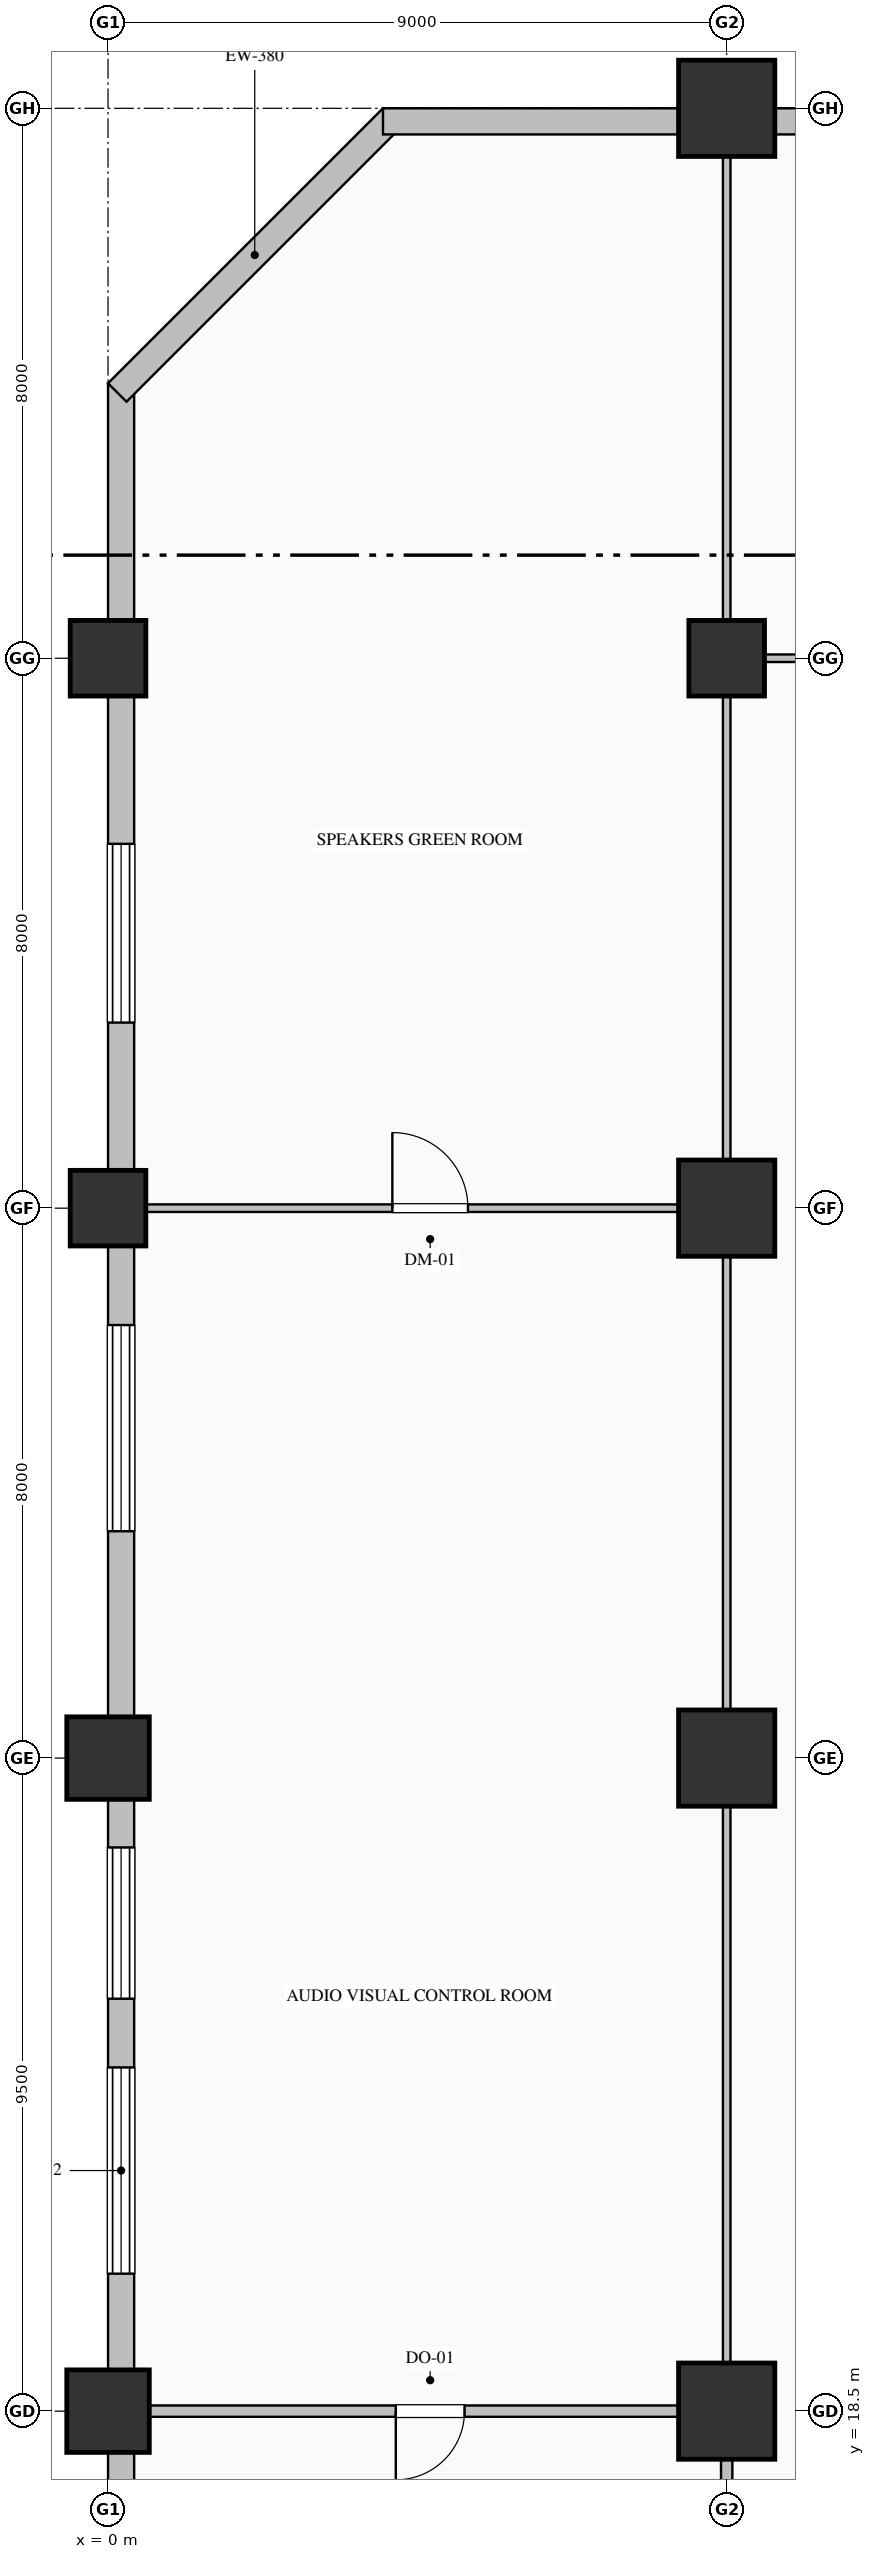
"""IFC4 building model, lengths in metres.
Left out: names, types, materials, properties, quantities, classifications, styles, units other than length and angle.
Written with IfcOpenShell. Run it as: python <this file> out.ifc"""

import sys

from ifc_helpers import new_model, si_unit, direction, frame, frame_2d, origin, origin_2d, place, context, subcontext, project, spatial, rectangle, hollow_rectangle, hollow_circle, extrude, element, fill, save


model = new_model("IFC4")
c1 = context("Model", 3, precision=1e-05, world=origin(), true_north=direction((0.0, 1.0)))
c2 = subcontext(c1, "Body", "Model", "MODEL_VIEW")
j1 = project(units=[si_unit("LENGTHUNIT", "METRE"), si_unit("PLANEANGLEUNIT", "RADIAN")], contexts=[c1])
p1 = place(None, origin())
s1 = spatial("IfcSite", under=j1, at=p1, CompositionType="ELEMENT")
p2 = place(p1, origin())
s2 = spatial("IfcBuilding", under=s1, at=p2, CompositionType="ELEMENT")
p3 = place(p2, frame((0.0, 0.0, 11.4)))
s3 = spatial("IfcBuildingStorey", under=s2, at=p3, CompositionType="ELEMENT", Elevation=11.4)
for number, where, z_axis, x_axis in (
    (1, (0.0, 18.5, 0.0), (0.0, 0.0, 1.0), (1.0, 0.0, 0.0)),
    (2, (0.0, 28.0, 0.0), (0.0, 0.0, 1.0), (1.0, 0.0, 0.0)),
):
    element("IfcColumn", number, at=place(p3, frame(where, z_axis=z_axis, x_axis=x_axis)), inside=s3, PredefinedType="COLUMN", context=c2, shape_type="SweptSolid", body=[
        extrude(hollow_circle(Radius=0.6, WallThickness=0.04, at=origin_2d()), origin(), (0.0, 0.0, 1.0), 6.0),
    ])
for number, where, z_axis, x_axis in (
    (3, (0.0, 36.0, 0.0), (0.0, 0.0, 1.0), (1.0, 0.0, 0.0)),
    (4, (0.0, 44.0, 0.0), (0.0, 0.0, 1.0), (1.0, 0.0, 0.0)),
):
    element("IfcColumn", number, at=place(p3, frame(where, z_axis=z_axis, x_axis=x_axis)), inside=s3, PredefinedType="COLUMN", context=c2, shape_type="SweptSolid", body=[
        extrude(hollow_rectangle(XDim=1.1, YDim=1.1, WallThickness=0.04, at=origin_2d()), origin(), (0.0, 0.0, 1.0), 6.0),
    ])
for number, where, z_axis, x_axis in (
    (5, (9.0, 18.5, 0.0), (0.0, 0.0, 1.0), (1.0, 0.0, 0.0)),
    (6, (9.0, 28.0, 0.0), (0.0, 0.0, 1.0), (1.0, 0.0, 0.0)),
    (7, (9.0, 36.0, 0.0), (0.0, 0.0, 1.0), (1.0, 0.0, 0.0)),
):
    element("IfcColumn", number, at=place(p3, frame(where, z_axis=z_axis, x_axis=x_axis)), inside=s3, PredefinedType="COLUMN", context=c2, shape_type="SweptSolid", body=[
        extrude(hollow_rectangle(XDim=1.4, YDim=1.4, WallThickness=0.05, at=origin_2d()), origin(), (0.0, 0.0, 1.0), 6.0),
    ])
p4 = place(p3, frame((9.0, 44.0, 0.0), z_axis=(0.0, 0.0, 1.0), x_axis=(1.0, 0.0, 0.0)))
e8 = element("IfcColumn", 8, at=p4, inside=s3, PredefinedType="COLUMN", context=c2, shape_type="SweptSolid", body=[
    extrude(rectangle(XDim=1.1, YDim=1.1, at=origin_2d()), origin(), (0.0, 0.0, 1.0), 6.0),
])
p5 = place(p3, frame((9.0, 52.0, 0.0), z_axis=(0.0, 0.0, 1.0), x_axis=(1.0, 0.0, 0.0)))
e9 = element("IfcColumn", 9, at=p5, inside=s3, PredefinedType="COLUMN", context=c2, shape_type="SweptSolid", body=[
    extrude(hollow_rectangle(XDim=1.4, YDim=1.4, WallThickness=0.05, at=origin_2d()), origin(), (0.0, 0.0, 1.0), 6.0),
])
p6 = place(p3, frame((0.19, 4.0, 0.0), z_axis=(0.0, 0.0, 1.0), x_axis=(0.0, 1.0, 0.0)))
e10 = element("IfcWall", 10, at=p6, inside=s3, PredefinedType="SOLIDWALL", context=c2, shape_type="SweptSolid", body=[
    extrude(rectangle(XDim=44.0, YDim=0.38, at=frame_2d((22.0, 0.0))), origin(), (0.0, 0.0, 1.0), 5.05),
])
p7 = place(p6, frame((2.3, 0.0, 0.85)))
e11 = element("IfcOpeningElement", 11, at=p7, cuts=e10, PredefinedType="OPENING", context=c2, shape_type="SweptSolid", body=[
    extrude(rectangle(XDim=2.6, YDim=3.1, at=frame_2d((1.3, 1.55))), frame((0.0, 0.2, 0.0), z_axis=(0.0, -1.0, 0.0), x_axis=(1.0, 0.0, 0.0)), (0.0, 0.0, 1.0), 0.4),
])
p8 = place(p6, frame((9.7, 0.0, 0.9)))
e12 = element("IfcOpeningElement", 12, at=p8, cuts=e10, PredefinedType="OPENING", context=c2, shape_type="SweptSolid", body=[
    extrude(rectangle(XDim=2.2, YDim=2.65, at=frame_2d((1.1, 1.325))), frame((0.0, 0.2, 0.0), z_axis=(0.0, -1.0, 0.0), x_axis=(1.0, 0.0, 0.0)), (0.0, 0.0, 1.0), 0.4),
])
p9 = place(p6, frame((16.5, 0.0, 0.85)))
e13 = element("IfcOpeningElement", 13, at=p9, cuts=e10, PredefinedType="OPENING", context=c2, shape_type="SweptSolid", body=[
    extrude(rectangle(XDim=3.0, YDim=3.2, at=frame_2d((1.5, 1.6))), frame((0.0, 0.2, 0.0), z_axis=(0.0, -1.0, 0.0), x_axis=(1.0, 0.0, 0.0)), (0.0, 0.0, 1.0), 0.4),
])
p10 = place(p6, frame((20.5, 0.0, 0.9)))
e14 = element("IfcOpeningElement", 14, at=p10, cuts=e10, PredefinedType="OPENING", context=c2, shape_type="SweptSolid", body=[
    extrude(rectangle(XDim=2.2, YDim=2.65, at=frame_2d((1.1, 1.325))), frame((0.0, 0.2, 0.0), z_axis=(0.0, -1.0, 0.0), x_axis=(1.0, 0.0, 0.0)), (0.0, 0.0, 1.0), 0.4),
])
p11 = place(p6, frame((27.3, 0.0, 0.85)))
e15 = element("IfcOpeningElement", 15, at=p11, cuts=e10, PredefinedType="OPENING", context=c2, shape_type="SweptSolid", body=[
    extrude(rectangle(XDim=3.0, YDim=3.2, at=frame_2d((1.5, 1.6))), frame((0.0, 0.2, 0.0), z_axis=(0.0, -1.0, 0.0), x_axis=(1.0, 0.0, 0.0)), (0.0, 0.0, 1.0), 0.4),
])
p12 = place(p6, frame((34.7, 0.0, 0.85)))
e16 = element("IfcOpeningElement", 16, at=p12, cuts=e10, PredefinedType="OPENING", context=c2, shape_type="SweptSolid", body=[
    extrude(rectangle(XDim=2.6, YDim=3.1, at=frame_2d((1.3, 1.55))), frame((0.0, 0.2, 0.0), z_axis=(0.0, -1.0, 0.0), x_axis=(1.0, 0.0, 0.0)), (0.0, 0.0, 1.0), 0.4),
])
p13 = place(p3, frame((0.134, 47.866, 0.0), z_axis=(0.0, 0.0, 1.0), x_axis=(0.707106781187, 0.707106781187, 0.0)))
e17 = element("IfcWall", 17, at=p13, inside=s3, PredefinedType="SOLIDWALL", context=c2, shape_type="SweptSolid", body=[
    extrude(rectangle(XDim=5.657, YDim=0.38, at=frame_2d((2.828, 0.0))), origin(), (0.0, 0.0, 1.0), 5.55),
])
p14 = place(p3, frame((4.0, 51.81, 0.0), z_axis=(0.0, 0.0, 1.0), x_axis=(1.0, 0.0, 0.0)))
e18 = element("IfcWall", 18, at=p14, inside=s3, PredefinedType="SOLIDWALL", context=c2, shape_type="SweptSolid", body=[
    extrude(rectangle(XDim=36.52, YDim=0.38, at=frame_2d((18.26, 0.0))), origin(), (0.0, 0.0, 1.0), 5.05),
])
p15 = place(p14, frame((16.7, 0.0, 0.85)))
e19 = element("IfcOpeningElement", 19, at=p15, cuts=e18, PredefinedType="OPENING", context=c2, shape_type="SweptSolid", body=[
    extrude(rectangle(XDim=2.6, YDim=3.1, at=frame_2d((1.3, 1.55))), frame((0.0, 0.2, 0.0), z_axis=(0.0, -1.0, 0.0), x_axis=(1.0, 0.0, 0.0)), (0.0, 0.0, 1.0), 0.4),
])
p16 = place(p14, frame((24.1, 0.0, 0.9)))
e20 = element("IfcOpeningElement", 20, at=p16, cuts=e18, PredefinedType="OPENING", context=c2, shape_type="SweptSolid", body=[
    extrude(rectangle(XDim=2.2, YDim=2.65, at=frame_2d((1.1, 1.325))), frame((0.0, 0.2, 0.0), z_axis=(0.0, -1.0, 0.0), x_axis=(1.0, 0.0, 0.0)), (0.0, 0.0, 1.0), 0.4),
])
p17 = place(p3, frame((9.0, 18.574, 0.0), z_axis=(0.0, 0.0, 1.0), x_axis=(0.0, 1.0, 0.0)))
e21 = element("IfcWall", 21, at=p17, inside=s3, PredefinedType="MOVABLE", context=c2, shape_type="SweptSolid", body=[
    extrude(rectangle(XDim=17.378, YDim=0.11, at=frame_2d((8.689, 0.0))), origin(), (0.0, 0.0, 1.0), 4.642),
])
p18 = place(p3, frame((9.0, 36.047, 0.0), z_axis=(0.0, 0.0, 1.0), x_axis=(0.0, 1.0, 0.0)))
e22 = element("IfcWall", 22, at=p18, inside=s3, PredefinedType="MOVABLE", context=c2, shape_type="SweptSolid", body=[
    extrude(rectangle(XDim=7.906, YDim=0.11, at=frame_2d((3.953, 0.0))), origin(), (0.0, 0.0, 1.0), 4.642),
])
p19 = place(p3, frame((9.0, 44.0, 0.0), z_axis=(0.0, 0.0, 1.0), x_axis=(1.0, 0.0, 0.0)))
e23 = element("IfcWall", 23, at=p19, inside=s3, PredefinedType="MOVABLE", context=c2, shape_type="SweptSolid", body=[
    extrude(rectangle(XDim=23.5, YDim=0.11, at=frame_2d((11.75, 0.0))), origin(), (0.0, 0.0, 1.0), 4.642),
])
p20 = place(p3, frame((9.0, 16.274, 0.0), z_axis=(0.0, 0.0, 1.0), x_axis=(0.0, 1.0, 0.0)))
e24 = element("IfcWall", 24, at=p20, inside=s3, PredefinedType="PARTITIONING", context=c2, shape_type="SweptSolid", body=[
    extrude(rectangle(XDim=2.151, YDim=0.165, at=frame_2d((1.076, 0.0))), origin(), (0.0, 0.0, 1.0), 5.55),
])
p21 = place(p3, frame((0.372, 36.0, 0.0), z_axis=(0.0, 0.0, 1.0), x_axis=(1.0, 0.0, 0.0)))
e25 = element("IfcWall", 25, at=p21, inside=s3, PredefinedType="MOVABLE", context=c2, shape_type="SweptSolid", body=[
    extrude(rectangle(XDim=8.628, YDim=0.11, at=frame_2d((4.314, 0.0))), origin(), (0.0, 0.0, 1.0), 4.642),
])
p22 = place(p21, frame((3.764, 0.0, 0.0)))
e26 = element("IfcOpeningElement", 26, at=p22, cuts=e25, PredefinedType="OPENING", context=c2, shape_type="SweptSolid", body=[
    extrude(rectangle(XDim=1.1, YDim=2.2, at=frame_2d((0.55, 1.1))), frame((0.0, 0.065, 0.0), z_axis=(0.0, -1.0, 0.0), x_axis=(1.0, 0.0, 0.0)), (0.0, 0.0, 1.0), 0.13),
])
p23 = place(p3, frame((9.0, 18.5, 0.0), z_axis=(0.0, 0.0, 1.0), x_axis=(-1.0, 0.0, 0.0)))
e27 = element("IfcWall", 27, at=p23, inside=s3, PredefinedType="PARTITIONING", context=c2, shape_type="SweptSolid", body=[
    extrude(rectangle(XDim=8.628, YDim=0.165, at=frame_2d((4.314, 0.0))), origin(), (0.0, 0.0, 1.0), 4.642),
])
p24 = place(p23, frame((3.814, 0.0, 0.0)))
e28 = element("IfcOpeningElement", 28, at=p24, cuts=e27, PredefinedType="OPENING", context=c2, shape_type="SweptSolid", body=[
    extrude(rectangle(XDim=1.0, YDim=2.15, at=frame_2d((0.5, 1.075))), frame((0.0, 0.093, 0.0), z_axis=(0.0, -1.0, 0.0), x_axis=(1.0, 0.0, 0.0)), (0.0, 0.0, 1.0), 0.185),
])
p25 = place(p3, frame((9.0, 51.628, 0.0), z_axis=(0.0, 0.0, 1.0), x_axis=(0.0, -1.0, 0.0)))
e29 = element("IfcWall", 29, at=p25, inside=s3, PredefinedType="MOVABLE", context=c2, shape_type="SweptSolid", body=[
    extrude(rectangle(XDim=7.581, YDim=0.11, at=frame_2d((3.791, 0.0))), origin(), (0.0, 0.0, 1.0), 4.642),
])
p26 = place(p9, origin())
e30 = element("IfcWindow", 30, at=p26, inside=s3, PartitioningType="TRIPLE_PANEL_VERTICAL", PredefinedType="WINDOW", context=c2, shape_type="SweptSolid", body=[
    extrude(rectangle(XDim=3.0, YDim=3.2, at=frame_2d((1.5, 1.6))), frame((0.0, 0.15, 0.0), z_axis=(0.0, -1.0, 0.0), x_axis=(1.0, 0.0, 0.0)), (0.0, 0.0, 1.0), 0.06),
])
fill(e13, e30)
p27 = place(p10, origin())
e31 = element("IfcWindow", 31, at=p27, inside=s3, PartitioningType="TRIPLE_PANEL_VERTICAL", PredefinedType="WINDOW", context=c2, shape_type="SweptSolid", body=[
    extrude(rectangle(XDim=2.2, YDim=2.65, at=frame_2d((1.1, 1.325))), frame((0.0, 0.15, 0.0), z_axis=(0.0, -1.0, 0.0), x_axis=(1.0, 0.0, 0.0)), (0.0, 0.0, 1.0), 0.06),
])
fill(e14, e31)
p28 = place(p11, origin())
e32 = element("IfcWindow", 32, at=p28, inside=s3, PartitioningType="TRIPLE_PANEL_VERTICAL", PredefinedType="WINDOW", context=c2, shape_type="SweptSolid", body=[
    extrude(rectangle(XDim=3.0, YDim=3.2, at=frame_2d((1.5, 1.6))), frame((0.0, 0.15, 0.0), z_axis=(0.0, -1.0, 0.0), x_axis=(1.0, 0.0, 0.0)), (0.0, 0.0, 1.0), 0.06),
])
fill(e15, e32)
p29 = place(p12, origin())
e33 = element("IfcWindow", 33, at=p29, inside=s3, PartitioningType="TRIPLE_PANEL_VERTICAL", PredefinedType="WINDOW", context=c2, shape_type="SweptSolid", body=[
    extrude(rectangle(XDim=2.6, YDim=3.1, at=frame_2d((1.3, 1.55))), frame((0.0, 0.15, 0.0), z_axis=(0.0, -1.0, 0.0), x_axis=(1.0, 0.0, 0.0)), (0.0, 0.0, 1.0), 0.06),
])
fill(e16, e33)
p30 = place(p24, origin())
e34 = element("IfcDoor", 34, at=p30, inside=s3, OperationType="SINGLE_SWING_RIGHT", PredefinedType="DOOR", context=c2, shape_type="SweptSolid", body=[
    extrude(rectangle(XDim=1.0, YDim=2.15, at=frame_2d((0.5, 1.075))), frame((0.0, 0.025, 0.0), z_axis=(0.0, -1.0, 0.0), x_axis=(1.0, 0.0, 0.0)), (0.0, 0.0, 1.0), 0.05),
])
fill(e28, e34)
p31 = place(p22, origin())
e35 = element("IfcDoor", 35, at=p31, inside=s3, OperationType="SINGLE_SWING_LEFT", PredefinedType="DOOR", context=c2, shape_type="SweptSolid", body=[
    extrude(rectangle(XDim=1.1, YDim=2.2, at=frame_2d((0.55, 1.1))), frame((0.0, 0.025, 0.0), z_axis=(0.0, -1.0, 0.0), x_axis=(1.0, 0.0, 0.0)), (0.0, 0.0, 1.0), 0.05),
])
fill(e26, e35)
save(model, sys.argv[1])
